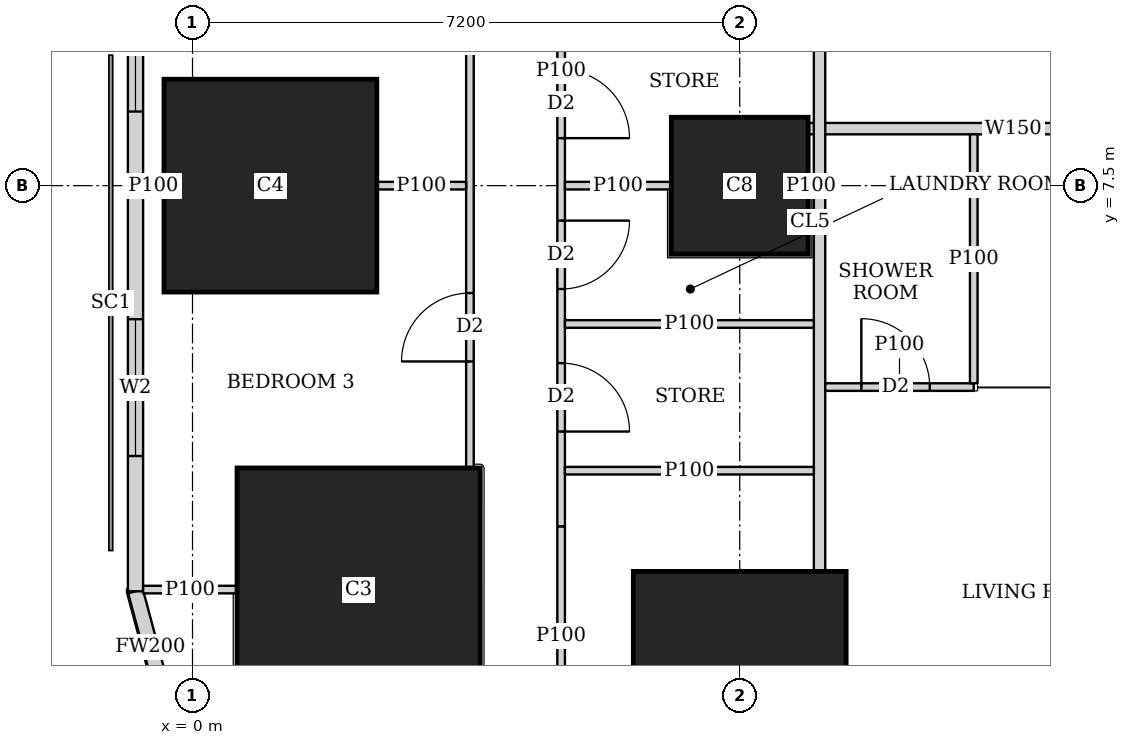
"""IFC4 building model, lengths in metres.
Left out: names, types, materials, properties, quantities, classifications, styles, units other than length and angle.
Written with IfcOpenShell. Run it as: python <this file> out.ifc"""

import sys

from ifc_helpers import new_model, si_unit, direction, frame, frame_2d, origin, origin_2d, place, context, subcontext, project, spatial, rectangle, extrude, element, fill, save


model = new_model("IFC4")
c1 = context("Model", 3, precision=1e-05, world=origin(), true_north=direction((0.0, 1.0)))
c2 = subcontext(c1, "Body", "Model", "MODEL_VIEW")
j1 = project(units=[si_unit("LENGTHUNIT", "METRE"), si_unit("PLANEANGLEUNIT", "RADIAN")], contexts=[c1])
p1 = place(None, origin())
s1 = spatial("IfcSite", under=j1, at=p1, CompositionType="ELEMENT")
p2 = place(p1, origin())
s2 = spatial("IfcBuilding", under=s1, at=p2, CompositionType="ELEMENT")
p3 = place(p2, frame((0.0, 0.0, 31.25)))
s3 = spatial("IfcBuildingStorey", under=s2, at=p3, CompositionType="ELEMENT", Elevation=31.25)
p4 = place(p3, frame((7.2, 1.025, 0.0), z_axis=(0.0, 0.0, 1.0), x_axis=(1.0, 0.0, 0.0)))
e1 = element("IfcColumn", 1, at=p4, inside=s3, PredefinedType="COLUMN", context=c2, shape_type="SweptSolid", body=[
    extrude(rectangle(XDim=2.8, YDim=2.8, at=origin_2d()), origin(), (0.0, 0.0, 1.0), 3.75),
])
p5 = place(p3, frame((2.186, 2.186, 0.0), z_axis=(0.0, 0.0, 1.0), x_axis=(1.0, 0.0, 0.0)))
e2 = element("IfcColumn", 2, at=p5, inside=s3, PredefinedType="COLUMN", context=c2, shape_type="SweptSolid", body=[
    extrude(rectangle(XDim=3.2, YDim=3.2, at=origin_2d()), origin(), (0.0, 0.0, 1.0), 3.75),
])
p6 = place(p3, frame((1.025, 7.5, 0.0), z_axis=(0.0, 0.0, 1.0), x_axis=(1.0, 0.0, 0.0)))
e3 = element("IfcColumn", 3, at=p6, inside=s3, PredefinedType="COLUMN", context=c2, shape_type="SweptSolid", body=[
    extrude(rectangle(XDim=2.8, YDim=2.8, at=origin_2d()), origin(), (0.0, 0.0, 1.0), 3.75),
])
p7 = place(p3, frame((7.2, 7.5, 0.0), z_axis=(0.0, 0.0, 1.0), x_axis=(1.0, 0.0, 0.0)))
e4 = element("IfcColumn", 4, at=p7, inside=s3, PredefinedType="COLUMN", context=c2, shape_type="SweptSolid", body=[
    extrude(rectangle(XDim=1.8, YDim=1.8, at=origin_2d()), origin(), (0.0, 0.0, 1.0), 3.75),
])
p8 = place(p3, frame((-0.75, 42.837, 0.0), z_axis=(0.0, 0.0, 1.0), x_axis=(0.0, -1.0, 0.0)))
e5 = element("IfcWall", 5, at=p8, inside=s3, PredefinedType="SOLIDWALL", context=c2, shape_type="SweptSolid", body=[
    extrude(rectangle(XDim=40.674, YDim=0.2, at=frame_2d((20.337, 0.0))), origin(), (0.0, 0.0, 1.0), 3.5),
])
p9 = place(p8, frame((1.78, 0.0, 0.9)))
e6 = element("IfcOpeningElement", 6, at=p9, cuts=e5, PredefinedType="OPENING", context=c2, shape_type="SweptSolid", body=[
    extrude(rectangle(XDim=1.8, YDim=1.5, at=frame_2d((0.9, 0.75))), frame((0.0, 0.11, 0.0), z_axis=(0.0, -1.0, 0.0), x_axis=(1.0, 0.0, 0.0)), (0.0, 0.0, 1.0), 0.22),
])
p10 = place(p8, frame((6.312, 0.0, 0.9)))
e7 = element("IfcOpeningElement", 7, at=p10, cuts=e5, PredefinedType="OPENING", context=c2, shape_type="SweptSolid", body=[
    extrude(rectangle(XDim=1.8, YDim=1.5, at=frame_2d((0.9, 0.75))), frame((0.0, 0.11, 0.0), z_axis=(0.0, -1.0, 0.0), x_axis=(1.0, 0.0, 0.0)), (0.0, 0.0, 1.0), 0.22),
])
p11 = place(p8, frame((10.062, 0.0, 0.9)))
e8 = element("IfcOpeningElement", 8, at=p11, cuts=e5, PredefinedType="OPENING", context=c2, shape_type="SweptSolid", body=[
    extrude(rectangle(XDim=1.8, YDim=1.5, at=frame_2d((0.9, 0.75))), frame((0.0, 0.11, 0.0), z_axis=(0.0, -1.0, 0.0), x_axis=(1.0, 0.0, 0.0)), (0.0, 0.0, 1.0), 0.22),
])
p12 = place(p8, frame((13.812, 0.0, 0.9)))
e9 = element("IfcOpeningElement", 9, at=p12, cuts=e5, PredefinedType="OPENING", context=c2, shape_type="SweptSolid", body=[
    extrude(rectangle(XDim=1.8, YDim=1.5, at=frame_2d((0.9, 0.75))), frame((0.0, 0.11, 0.0), z_axis=(0.0, -1.0, 0.0), x_axis=(1.0, 0.0, 0.0)), (0.0, 0.0, 1.0), 0.22),
])
p13 = place(p8, frame((17.562, 0.0, 0.9)))
e10 = element("IfcOpeningElement", 10, at=p13, cuts=e5, PredefinedType="OPENING", context=c2, shape_type="SweptSolid", body=[
    extrude(rectangle(XDim=1.8, YDim=1.5, at=frame_2d((0.9, 0.75))), frame((0.0, 0.11, 0.0), z_axis=(0.0, -1.0, 0.0), x_axis=(1.0, 0.0, 0.0)), (0.0, 0.0, 1.0), 0.22),
])
p14 = place(p8, frame((21.312, 0.0, 0.9)))
e11 = element("IfcOpeningElement", 11, at=p14, cuts=e5, PredefinedType="OPENING", context=c2, shape_type="SweptSolid", body=[
    extrude(rectangle(XDim=1.8, YDim=1.5, at=frame_2d((0.9, 0.75))), frame((0.0, 0.11, 0.0), z_axis=(0.0, -1.0, 0.0), x_axis=(1.0, 0.0, 0.0)), (0.0, 0.0, 1.0), 0.22),
])
p15 = place(p8, frame((25.062, 0.0, 0.9)))
e12 = element("IfcOpeningElement", 12, at=p15, cuts=e5, PredefinedType="OPENING", context=c2, shape_type="SweptSolid", body=[
    extrude(rectangle(XDim=1.8, YDim=1.5, at=frame_2d((0.9, 0.75))), frame((0.0, 0.11, 0.0), z_axis=(0.0, -1.0, 0.0), x_axis=(1.0, 0.0, 0.0)), (0.0, 0.0, 1.0), 0.22),
])
p16 = place(p8, frame((28.812, 0.0, 0.9)))
e13 = element("IfcOpeningElement", 13, at=p16, cuts=e5, PredefinedType="OPENING", context=c2, shape_type="SweptSolid", body=[
    extrude(rectangle(XDim=1.8, YDim=1.5, at=frame_2d((0.9, 0.75))), frame((0.0, 0.11, 0.0), z_axis=(0.0, -1.0, 0.0), x_axis=(1.0, 0.0, 0.0)), (0.0, 0.0, 1.0), 0.22),
])
p17 = place(p8, frame((32.562, 0.0, 0.9)))
e14 = element("IfcOpeningElement", 14, at=p17, cuts=e5, PredefinedType="OPENING", context=c2, shape_type="SweptSolid", body=[
    extrude(rectangle(XDim=1.8, YDim=1.5, at=frame_2d((0.9, 0.75))), frame((0.0, 0.11, 0.0), z_axis=(0.0, -1.0, 0.0), x_axis=(1.0, 0.0, 0.0)), (0.0, 0.0, 1.0), 0.22),
])
p18 = place(p8, frame((37.094, 0.0, 0.9)))
e15 = element("IfcOpeningElement", 15, at=p18, cuts=e5, PredefinedType="OPENING", context=c2, shape_type="SweptSolid", body=[
    extrude(rectangle(XDim=1.8, YDim=1.5, at=frame_2d((0.9, 0.75))), frame((0.0, 0.11, 0.0), z_axis=(0.0, -1.0, 0.0), x_axis=(1.0, 0.0, 0.0)), (0.0, 0.0, 1.0), 0.22),
])
p19 = place(p3, frame((-0.75, 2.163, 0.0), z_axis=(0.0, 0.0, 1.0), x_axis=(0.259168954497, -0.965832000415, 0.0)))
e16 = element("IfcWall", 16, at=p19, inside=s3, PredefinedType="SOLIDWALL", context=c2, shape_type="SweptSolid", body=[
    extrude(rectangle(XDim=1.513, YDim=0.2, at=frame_2d((0.756, 0.0))), origin(), (0.0, 0.0, 1.0), 3.5),
])
p20 = place(p3, frame((8.25, 2.426, 0.0), z_axis=(0.0, 0.0, 1.0), x_axis=(0.0, 1.0, 0.0)))
e17 = element("IfcWall", 17, at=p20, inside=s3, PredefinedType="SOLIDWALL", context=c2, shape_type="SweptSolid", body=[
    extrude(rectangle(XDim=40.173, YDim=0.15, at=frame_2d((20.086, 0.0))), origin(), (0.0, 0.0, 1.0), 3.5),
])
p21 = place(p20, frame((14.161, 0.0, 0.0)))
e18 = element("IfcOpeningElement", 18, at=p21, cuts=e17, PredefinedType="OPENING", context=c2, shape_type="SweptSolid", body=[
    extrude(rectangle(XDim=1.0, YDim=2.1, at=frame_2d((0.5, 1.05))), frame((0.0, 0.085, 0.0), z_axis=(0.0, -1.0, 0.0), x_axis=(1.0, 0.0, 0.0)), (0.0, 0.0, 1.0), 0.17),
])
p22 = place(p20, frame((17.487, 0.0, 0.0)))
e19 = element("IfcOpeningElement", 19, at=p22, cuts=e17, PredefinedType="OPENING", context=c2, shape_type="SweptSolid", body=[
    extrude(rectangle(XDim=1.0, YDim=2.1, at=frame_2d((0.5, 1.05))), frame((0.0, 0.085, 0.0), z_axis=(0.0, -1.0, 0.0), x_axis=(1.0, 0.0, 0.0)), (0.0, 0.0, 1.0), 0.17),
])
p23 = place(p20, frame((29.161, 0.0, 0.0)))
e20 = element("IfcOpeningElement", 20, at=p23, cuts=e17, PredefinedType="OPENING", context=c2, shape_type="SweptSolid", body=[
    extrude(rectangle(XDim=1.0, YDim=2.1, at=frame_2d((0.5, 1.05))), frame((0.0, 0.085, 0.0), z_axis=(0.0, -1.0, 0.0), x_axis=(1.0, 0.0, 0.0)), (0.0, 0.0, 1.0), 0.17),
])
p24 = place(p3, frame((13.499, 8.25, 0.0), z_axis=(0.0, 0.0, 1.0), x_axis=(-1.0, 0.0, 0.0)))
e21 = element("IfcWall", 21, at=p24, inside=s3, PredefinedType="SOLIDWALL", context=c2, shape_type="SweptSolid", body=[
    extrude(rectangle(XDim=5.399, YDim=0.15, at=frame_2d((2.699, 0.0))), origin(), (0.0, 0.0, 1.0), 3.5),
])
p25 = place(p24, frame((0.66, 0.0, 0.0)))
e22 = element("IfcOpeningElement", 22, at=p25, cuts=e21, PredefinedType="OPENING", context=c2, shape_type="SweptSolid", body=[
    extrude(rectangle(XDim=1.0, YDim=2.1, at=frame_2d((0.5, 1.05))), frame((0.0, 0.085, 0.0), z_axis=(0.0, -1.0, 0.0), x_axis=(1.0, 0.0, 0.0)), (0.0, 0.0, 1.0), 0.17),
])
p26 = place(p3, frame((3.65, 3.787, 0.0), z_axis=(0.0, 0.0, 1.0), x_axis=(0.0, 1.0, 0.0)))
e23 = element("IfcWall", 23, at=p26, inside=s3, PredefinedType="PARTITIONING", context=c2, shape_type="SweptSolid", body=[
    extrude(rectangle(XDim=11.213, YDim=0.1, at=frame_2d((5.606, 0.0))), origin(), (0.0, 0.0, 1.0), 3.5),
])
p27 = place(p26, frame((8.9, 0.0, 0.0)))
e24 = element("IfcOpeningElement", 24, at=p27, cuts=e23, PredefinedType="OPENING", context=c2, shape_type="SweptSolid", body=[
    extrude(rectangle(XDim=0.9, YDim=2.1, at=frame_2d((0.45, 1.05))), frame((0.0, 0.06, 0.0), z_axis=(0.0, -1.0, 0.0), x_axis=(1.0, 0.0, 0.0)), (0.0, 0.0, 1.0), 0.12),
])
p28 = place(p26, frame((6.363, 0.0, 0.0)))
e25 = element("IfcOpeningElement", 25, at=p28, cuts=e23, PredefinedType="OPENING", context=c2, shape_type="SweptSolid", body=[
    extrude(rectangle(XDim=0.9, YDim=2.1, at=frame_2d((0.45, 1.05))), frame((0.0, 0.06, 0.0), z_axis=(0.0, -1.0, 0.0), x_axis=(1.0, 0.0, 0.0)), (0.0, 0.0, 1.0), 0.12),
])
p29 = place(p26, frame((1.4, 0.0, 0.0)))
e26 = element("IfcOpeningElement", 26, at=p29, cuts=e23, PredefinedType="OPENING", context=c2, shape_type="SweptSolid", body=[
    extrude(rectangle(XDim=0.9, YDim=2.1, at=frame_2d((0.45, 1.05))), frame((0.0, 0.06, 0.0), z_axis=(0.0, -1.0, 0.0), x_axis=(1.0, 0.0, 0.0)), (0.0, 0.0, 1.0), 0.12),
])
p30 = place(p3, frame((4.85, 0.121, 0.0), z_axis=(0.0, 0.0, 1.0), x_axis=(0.0, 1.0, 0.0)))
e27 = element("IfcWall", 27, at=p30, inside=s3, PredefinedType="PARTITIONING", context=c2, shape_type="SweptSolid", body=[
    extrude(rectangle(XDim=2.897, YDim=0.1, at=frame_2d((1.448, 0.0))), origin(), (0.0, 0.0, 1.0), 2.05),
])
p31 = place(p3, frame((4.85, 3.018, 0.0), z_axis=(0.0, 0.0, 1.0), x_axis=(0.0, 1.0, 0.0)))
e28 = element("IfcWall", 28, at=p31, inside=s3, PredefinedType="PARTITIONING", context=c2, shape_type="SweptSolid", body=[
    extrude(rectangle(XDim=11.982, YDim=0.1, at=frame_2d((5.991, 0.0))), origin(), (0.0, 0.0, 1.0), 3.5),
])
p32 = place(p31, frame((10.427, 0.0, 0.0)))
e29 = element("IfcOpeningElement", 29, at=p32, cuts=e28, PredefinedType="OPENING", context=c2, shape_type="SweptSolid", body=[
    extrude(rectangle(XDim=0.9, YDim=2.1, at=frame_2d((0.45, 1.05))), frame((0.0, 0.06, 0.0), z_axis=(0.0, -1.0, 0.0), x_axis=(1.0, 0.0, 0.0)), (0.0, 0.0, 1.0), 0.12),
])
p33 = place(p31, frame((6.982, 0.0, 0.0)))
e30 = element("IfcOpeningElement", 30, at=p33, cuts=e28, PredefinedType="OPENING", context=c2, shape_type="SweptSolid", body=[
    extrude(rectangle(XDim=0.9, YDim=2.1, at=frame_2d((0.45, 1.05))), frame((0.0, 0.06, 0.0), z_axis=(0.0, -1.0, 0.0), x_axis=(1.0, 0.0, 0.0)), (0.0, 0.0, 1.0), 0.12),
])
p34 = place(p31, frame((3.122, 0.0, 0.0)))
e31 = element("IfcOpeningElement", 31, at=p34, cuts=e28, PredefinedType="OPENING", context=c2, shape_type="SweptSolid", body=[
    extrude(rectangle(XDim=0.9, YDim=2.1, at=frame_2d((0.45, 1.05))), frame((0.0, 0.06, 0.0), z_axis=(0.0, -1.0, 0.0), x_axis=(1.0, 0.0, 0.0)), (0.0, 0.0, 1.0), 0.12),
])
p35 = place(p31, frame((8.552, 0.0, 0.0)))
e32 = element("IfcOpeningElement", 32, at=p35, cuts=e28, PredefinedType="OPENING", context=c2, shape_type="SweptSolid", body=[
    extrude(rectangle(XDim=0.9, YDim=2.1, at=frame_2d((0.45, 1.05))), frame((0.0, 0.06, 0.0), z_axis=(0.0, -1.0, 0.0), x_axis=(1.0, 0.0, 0.0)), (0.0, 0.0, 1.0), 0.12),
])
p36 = place(p31, frame((5.107, 0.0, 0.0)))
e33 = element("IfcOpeningElement", 33, at=p36, cuts=e28, PredefinedType="OPENING", context=c2, shape_type="SweptSolid", body=[
    extrude(rectangle(XDim=0.9, YDim=2.1, at=frame_2d((0.45, 1.05))), frame((0.0, 0.06, 0.0), z_axis=(0.0, -1.0, 0.0), x_axis=(1.0, 0.0, 0.0)), (0.0, 0.0, 1.0), 0.12),
])
p37 = place(p31, frame((1.247, 0.0, 0.0)))
e34 = element("IfcOpeningElement", 34, at=p37, cuts=e28, PredefinedType="OPENING", context=c2, shape_type="SweptSolid", body=[
    extrude(rectangle(XDim=0.9, YDim=2.1, at=frame_2d((0.45, 1.05))), frame((0.0, 0.06, 0.0), z_axis=(0.0, -1.0, 0.0), x_axis=(1.0, 0.0, 0.0)), (0.0, 0.0, 1.0), 0.12),
])
p38 = place(p3, frame((-0.65, 2.186, 0.0), z_axis=(0.0, 0.0, 1.0), x_axis=(1.0, 0.0, 0.0)))
e35 = element("IfcWall", 35, at=p38, inside=s3, PredefinedType="PARTITIONING", context=c2, shape_type="SweptSolid", body=[
    extrude(rectangle(XDim=1.235, YDim=0.1, at=frame_2d((0.617, 0.0))), origin(), (0.0, 0.0, 1.0), 3.5),
])
p39 = place(p3, frame((-0.65, 7.5, 0.0), z_axis=(0.0, 0.0, 1.0), x_axis=(1.0, 0.0, 0.0)))
e36 = element("IfcWall", 36, at=p39, inside=s3, PredefinedType="PARTITIONING", context=c2, shape_type="SweptSolid", body=[
    extrude(rectangle(XDim=0.274, YDim=0.1, at=frame_2d((0.137, 0.0))), origin(), (0.0, 0.0, 1.0), 3.5),
])
p40 = place(p3, frame((2.426, 7.5, 0.0), z_axis=(0.0, 0.0, 1.0), x_axis=(1.0, 0.0, 0.0)))
e37 = element("IfcWall", 37, at=p40, inside=s3, PredefinedType="PARTITIONING", context=c2, shape_type="SweptSolid", body=[
    extrude(rectangle(XDim=1.174, YDim=0.1, at=frame_2d((0.587, 0.0))), origin(), (0.0, 0.0, 1.0), 2.05),
])
p41 = place(p3, frame((4.9, 3.75, 0.0), z_axis=(0.0, 0.0, 1.0), x_axis=(1.0, 0.0, 0.0)))
e38 = element("IfcWall", 38, at=p41, inside=s3, PredefinedType="PARTITIONING", context=c2, shape_type="SweptSolid", body=[
    extrude(rectangle(XDim=3.275, YDim=0.1, at=frame_2d((1.638, 0.0))), origin(), (0.0, 0.0, 1.0), 3.5),
])
p42 = place(p3, frame((4.9, 7.5, 0.0), z_axis=(0.0, 0.0, 1.0), x_axis=(1.0, 0.0, 0.0)))
e39 = element("IfcWall", 39, at=p42, inside=s3, PredefinedType="PARTITIONING", context=c2, shape_type="SweptSolid", body=[
    extrude(rectangle(XDim=1.399, YDim=0.1, at=frame_2d((0.7, 0.0))), origin(), (0.0, 0.0, 1.0), 3.5),
])
p43 = place(p3, frame((8.101, 7.5, 0.0), z_axis=(0.0, 0.0, 1.0), x_axis=(1.0, 0.0, 0.0)))
e40 = element("IfcWall", 40, at=p43, inside=s3, PredefinedType="PARTITIONING", context=c2, shape_type="SweptSolid", body=[
    extrude(rectangle(XDim=0.074, YDim=0.1, at=frame_2d((0.037, 0.0))), origin(), (0.0, 0.0, 1.0), 3.5),
])
p44 = place(p3, frame((4.9, 5.68, 0.0), z_axis=(0.0, 0.0, 1.0), x_axis=(1.0, 0.0, 0.0)))
e41 = element("IfcWall", 41, at=p44, inside=s3, PredefinedType="PARTITIONING", context=c2, shape_type="SweptSolid", body=[
    extrude(rectangle(XDim=3.275, YDim=0.1, at=frame_2d((1.638, 0.0))), origin(), (0.0, 0.0, 1.0), 3.5),
])
p45 = place(p3, frame((10.279, 4.85, 0.0), z_axis=(0.0, 0.0, 1.0), x_axis=(-1.0, 0.0, 0.0)))
e42 = element("IfcWall", 42, at=p45, inside=s3, PredefinedType="PARTITIONING", context=c2, shape_type="SweptSolid", body=[
    extrude(rectangle(XDim=1.954, YDim=0.1, at=frame_2d((0.977, 0.0))), origin(), (0.0, 0.0, 1.0), 3.5),
])
p46 = place(p45, frame((0.579, 0.0, 0.0)))
e43 = element("IfcOpeningElement", 43, at=p46, cuts=e42, PredefinedType="OPENING", context=c2, shape_type="SweptSolid", body=[
    extrude(rectangle(XDim=0.9, YDim=2.1, at=frame_2d((0.45, 1.05))), frame((0.0, 0.06, 0.0), z_axis=(0.0, -1.0, 0.0), x_axis=(1.0, 0.0, 0.0)), (0.0, 0.0, 1.0), 0.12),
])
p47 = place(p3, frame((10.279, 4.9, 0.0), z_axis=(0.0, 0.0, 1.0), x_axis=(0.0, 1.0, 0.0)))
e44 = element("IfcWall", 44, at=p47, inside=s3, PredefinedType="PARTITIONING", context=c2, shape_type="SweptSolid", body=[
    extrude(rectangle(XDim=3.275, YDim=0.1, at=frame_2d((1.638, 0.0))), origin(), (0.0, 0.0, 1.0), 3.5),
])
p48 = place(p17, origin())
e45 = element("IfcWindow", 45, at=p48, inside=s3, PartitioningType="SINGLE_PANEL", PredefinedType="WINDOW", context=c2, shape_type="SweptSolid", body=[
    extrude(rectangle(XDim=1.8, YDim=1.5, at=frame_2d((0.9, 0.75))), frame((0.0, 0.03, 0.0), z_axis=(0.0, -1.0, 0.0), x_axis=(1.0, 0.0, 0.0)), (0.0, 0.0, 1.0), 0.06),
])
fill(e14, e45)
p49 = place(p18, origin())
e46 = element("IfcWindow", 46, at=p49, inside=s3, PartitioningType="SINGLE_PANEL", PredefinedType="WINDOW", context=c2, shape_type="SweptSolid", body=[
    extrude(rectangle(XDim=1.8, YDim=1.5, at=frame_2d((0.9, 0.75))), frame((0.0, 0.03, 0.0), z_axis=(0.0, -1.0, 0.0), x_axis=(1.0, 0.0, 0.0)), (0.0, 0.0, 1.0), 0.06),
])
fill(e15, e46)
p50 = place(p29, origin())
e47 = element("IfcDoor", 47, at=p50, inside=s3, OperationType="SINGLE_SWING_LEFT", PredefinedType="DOOR", context=c2, shape_type="SweptSolid", body=[
    extrude(rectangle(XDim=0.9, YDim=2.1, at=frame_2d((0.45, 1.05))), frame((0.0, 0.025, 0.0), z_axis=(0.0, -1.0, 0.0), x_axis=(1.0, 0.0, 0.0)), (0.0, 0.0, 1.0), 0.05),
])
fill(e26, e47)
p51 = place(p34, origin())
e48 = element("IfcDoor", 48, at=p51, inside=s3, OperationType="SINGLE_SWING_LEFT", PredefinedType="DOOR", context=c2, shape_type="SweptSolid", body=[
    extrude(rectangle(XDim=0.9, YDim=2.1, at=frame_2d((0.45, 1.05))), frame((0.0, 0.025, 0.0), z_axis=(0.0, -1.0, 0.0), x_axis=(1.0, 0.0, 0.0)), (0.0, 0.0, 1.0), 0.05),
])
fill(e31, e48)
p52 = place(p36, origin())
e49 = element("IfcDoor", 49, at=p52, inside=s3, OperationType="SINGLE_SWING_RIGHT", PredefinedType="DOOR", context=c2, shape_type="SweptSolid", body=[
    extrude(rectangle(XDim=0.9, YDim=2.1, at=frame_2d((0.45, 1.05))), frame((0.0, 0.025, 0.0), z_axis=(0.0, -1.0, 0.0), x_axis=(1.0, 0.0, 0.0)), (0.0, 0.0, 1.0), 0.05),
])
fill(e33, e49)
p53 = place(p37, origin())
e50 = element("IfcDoor", 50, at=p53, inside=s3, OperationType="SINGLE_SWING_RIGHT", PredefinedType="DOOR", context=c2, shape_type="SweptSolid", body=[
    extrude(rectangle(XDim=0.9, YDim=2.1, at=frame_2d((0.45, 1.05))), frame((0.0, 0.025, 0.0), z_axis=(0.0, -1.0, 0.0), x_axis=(1.0, 0.0, 0.0)), (0.0, 0.0, 1.0), 0.05),
])
fill(e34, e50)
p54 = place(p46, origin())
e51 = element("IfcDoor", 51, at=p54, inside=s3, OperationType="SINGLE_SWING_LEFT", PredefinedType="DOOR", context=c2, shape_type="SweptSolid", body=[
    extrude(rectangle(XDim=0.9, YDim=2.1, at=frame_2d((0.45, 1.05))), frame((0.0, 0.025, 0.0), z_axis=(0.0, -1.0, 0.0), x_axis=(1.0, 0.0, 0.0)), (0.0, 0.0, 1.0), 0.05),
])
fill(e43, e51)
save(model, sys.argv[1])
